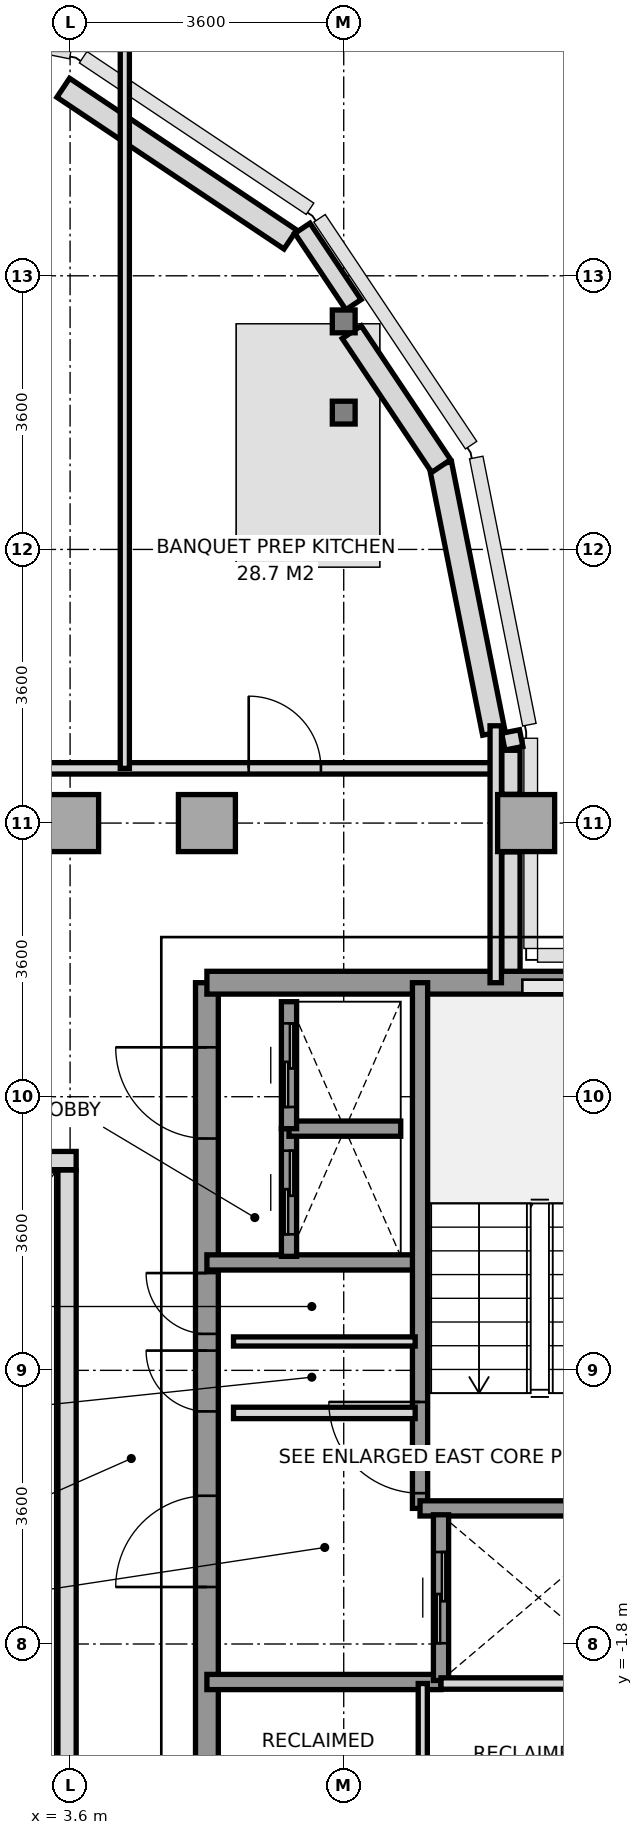
"""IFC4 building model, lengths in metres.
Left out: names, types, materials, properties, quantities, classifications, styles, units other than length and angle.
Written with IfcOpenShell. Run it as: python <this file> out.ifc"""

import sys

from ifc_helpers import new_model, si_unit, direction, frame, frame_2d, origin, origin_2d, place, context, subcontext, project, spatial, rectangle, i_section, extrude, source, transform, mapped, element, fill, save


model = new_model("IFC4")
c1 = context("Model", 3, precision=1e-05, world=origin(), true_north=direction((0.0, 1.0)))
c2 = subcontext(c1, "Body", "Model", "MODEL_VIEW")
j1 = project(units=[si_unit("LENGTHUNIT", "METRE"), si_unit("PLANEANGLEUNIT", "RADIAN")], contexts=[c1])
p1 = place(None, origin())
s1 = spatial("IfcSite", under=j1, at=p1, CompositionType="ELEMENT")
p2 = place(p1, origin())
s2 = spatial("IfcBuilding", under=s1, at=p2, CompositionType="ELEMENT")
p3 = place(p2, frame((0.0, 0.0, 258.8)))
s3 = spatial("IfcBuildingStorey", under=s2, at=p3, CompositionType="ELEMENT", Elevation=258.8)
m1 = source(origin(), c2, "Body", "SweptSolid", [
    extrude(rectangle(XDim=0.75, YDim=0.75, at=origin_2d()), origin(), (0.0, 0.0, 1.0), 3.01),
])
for number, where, z_axis, x_axis in (
    (1, (3.6, 9.0, 0.0), (0.0, 0.0, 1.0), (1.0, 0.0, 0.0)),
    (2, (5.4, 9.0, 0.0), (0.0, 0.0, 1.0), (1.0, 0.0, 0.0)),
):
    element("IfcColumn", number, at=place(p3, frame(where, z_axis=z_axis, x_axis=x_axis)), inside=s3, PredefinedType="COLUMN", context=c2, shape_type="MappedRepresentation", body=[
        mapped(m1, transform((0.0, 0.0, 0.0), x_axis=(1.0, 0.0, 0.0), y_axis=(0.0, 1.0, 0.0), z_axis=(0.0, 0.0, 1.0), scale=1.0)),
    ])
m2 = source(origin(), c2, "Body", "SweptSolid", [
    extrude(i_section(OverallWidth=0.3, OverallDepth=0.3, WebThickness=0.011, FlangeThickness=0.019, at=origin_2d()), origin(), (0.0, 0.0, 1.0), 3.01),
])
for number, where, z_axis, x_axis in (
    (3, (7.2, 14.4, 0.0), (0.0, 0.0, 1.0), (1.0, 0.0, 0.0)),
    (4, (7.2, 15.6, 0.0), (0.0, 0.0, 1.0), (1.0, 0.0, 0.0)),
):
    element("IfcColumn", number, at=place(p3, frame(where, z_axis=z_axis, x_axis=x_axis)), inside=s3, PredefinedType="COLUMN", context=c2, shape_type="MappedRepresentation", body=[
        mapped(m2, transform((0.0, 0.0, 0.0), x_axis=(1.0, 0.0, 0.0), y_axis=(0.0, 1.0, 0.0), z_axis=(0.0, 0.0, 1.0), scale=1.0)),
    ])
p4 = place(p3, frame((9.6, 9.0, 0.0), z_axis=(0.0, 0.0, 1.0), x_axis=(1.0, 0.0, 0.0)))
e5 = element("IfcColumn", 5, at=p4, inside=s3, PredefinedType="COLUMN", context=c2, shape_type="MappedRepresentation", body=[
    mapped(m1, transform((0.0, 0.0, 0.0), x_axis=(1.0, 0.0, 0.0), y_axis=(0.0, 1.0, 0.0), z_axis=(0.0, 0.0, 1.0), scale=1.0)),
])
p5 = place(p3, frame((9.175, 10.185, 0.0), z_axis=(0.0, 0.0, 1.0), x_axis=(-0.195114232679, 0.980780523974, 0.0)))
e6 = element("IfcWall", 6, at=p5, inside=s3, PredefinedType="SOLIDWALL", context=c2, shape_type="SweptSolid", body=[
    extrude(rectangle(XDim=3.609, YDim=0.3, at=frame_2d((1.804, 0.0))), origin(), (0.0, 0.0, 1.0), 3.01),
])
p6 = place(p3, frame((8.482, 13.698, 0.0), z_axis=(0.0, 0.0, 1.0), x_axis=(-0.555604299396, 0.831446848868, 0.0)))
e7 = element("IfcWall", 7, at=p6, inside=s3, PredefinedType="SOLIDWALL", context=c2, shape_type="SweptSolid", body=[
    extrude(rectangle(XDim=2.118, YDim=0.3, at=frame_2d((1.059, 0.0))), origin(), (0.0, 0.0, 1.0), 2.61),
])
p7 = place(p3, frame((6.498, 16.677, 0.0), z_axis=(0.0, 0.0, 1.0), x_axis=(-0.831443568068, 0.555609208993, 0.0)))
e8 = element("IfcWall", 8, at=p7, inside=s3, PredefinedType="SOLIDWALL", context=c2, shape_type="SweptSolid", body=[
    extrude(rectangle(XDim=3.594, YDim=0.3, at=frame_2d((1.797, 0.0))), origin(), (0.0, 0.0, 1.0), 3.01),
])
p8 = place(p3, frame((6.656, 16.825, 0.0), z_axis=(0.0, 0.0, 1.0), x_axis=(0.555585388542, -0.831459485506, 0.0)))
e9 = element("IfcWall", 9, at=p8, inside=s3, PredefinedType="PARAPET", context=c2, shape_type="SweptSolid", body=[
    extrude(rectangle(XDim=1.209, YDim=0.24, at=frame_2d((0.604, 0.0))), origin(), (0.0, 0.0, 1.0), 1.15),
])
p9 = place(p3, frame((9.395, 10.204, 0.0), z_axis=(0.0, 0.0, 1.0), x_axis=(0.194859894132, -0.980831087221, 0.0)))
e10 = element("IfcWall", 10, at=p9, inside=s3, PredefinedType="PARAPET", context=c2, shape_type="SweptSolid", body=[
    extrude(rectangle(XDim=0.224, YDim=0.24, at=frame_2d((0.112, 0.0))), origin(), (0.0, 0.0, 1.0), 1.15),
])
p10 = place(p3, frame((9.4, 9.958, 0.0), z_axis=(0.0, 0.0, 1.0), x_axis=(0.0, -1.0, 0.0)))
e11 = element("IfcWall", 11, at=p10, inside=s3, PredefinedType="PARAPET", context=c2, shape_type="SweptSolid", body=[
    extrude(rectangle(XDim=0.58, YDim=0.24, at=frame_2d((0.29, 0.0))), origin(), (0.0, 0.0, 1.0), 1.15),
])
p11 = place(p3, frame((9.4, 8.622, 0.0), z_axis=(0.0, 0.0, 1.0), x_axis=(0.0, -1.0, 0.0)))
e12 = element("IfcWall", 12, at=p11, inside=s3, PredefinedType="PARAPET", context=c2, shape_type="SweptSolid", body=[
    extrude(rectangle(XDim=1.669, YDim=0.24, at=frame_2d((0.834, 0.0))), origin(), (0.0, 0.0, 1.0), 1.15),
])
p12 = place(p3, frame((5.4, -5.6, 0.0), z_axis=(0.0, 0.0, 1.0), x_axis=(0.0, 1.0, 0.0)))
e13 = element("IfcWall", 13, at=p12, inside=s3, PredefinedType="SHEAR", context=c2, shape_type="SweptSolid", body=[
    extrude(rectangle(XDim=12.5, YDim=0.3, at=frame_2d((6.25, 0.0))), origin(), (0.0, 0.0, 1.0), 3.01),
])
p13 = place(p12, frame((4.55, 0.0, 0.0)))
e14 = element("IfcOpeningElement", 14, at=p13, cuts=e13, PredefinedType="OPENING", context=c2, shape_type="SweptSolid", body=[
    extrude(rectangle(XDim=1.2, YDim=2.2, at=frame_2d((0.6, 1.1))), frame((0.0, 0.16, 0.0), z_axis=(0.0, -1.0, 0.0), x_axis=(1.0, 0.0, 0.0)), (0.0, 0.0, 1.0), 0.32),
])
p14 = place(p12, frame((10.45, 0.0, 0.0)))
e15 = element("IfcOpeningElement", 15, at=p14, cuts=e13, PredefinedType="OPENING", context=c2, shape_type="SweptSolid", body=[
    extrude(rectangle(XDim=1.2, YDim=2.2, at=frame_2d((0.6, 1.1))), frame((0.0, 0.16, 0.0), z_axis=(0.0, -1.0, 0.0), x_axis=(1.0, 0.0, 0.0)), (0.0, 0.0, 1.0), 0.32),
])
p15 = place(p12, frame((6.86, 0.0, 0.0)))
e16 = element("IfcOpeningElement", 16, at=p15, cuts=e13, PredefinedType="OPENING", context=c2, shape_type="SweptSolid", body=[
    extrude(rectangle(XDim=0.8, YDim=2.1, at=frame_2d((0.4, 1.05))), frame((0.0, 0.16, 0.0), z_axis=(0.0, -1.0, 0.0), x_axis=(1.0, 0.0, 0.0)), (0.0, 0.0, 1.0), 0.32),
])
p16 = place(p12, frame((7.88, 0.0, 0.0)))
e17 = element("IfcOpeningElement", 17, at=p16, cuts=e13, PredefinedType="OPENING", context=c2, shape_type="SweptSolid", body=[
    extrude(rectangle(XDim=0.8, YDim=2.1, at=frame_2d((0.4, 1.05))), frame((0.0, 0.16, 0.0), z_axis=(0.0, -1.0, 0.0), x_axis=(1.0, 0.0, 0.0)), (0.0, 0.0, 1.0), 0.32),
])
p17 = place(p3, frame((5.4, 6.9, 0.0), z_axis=(0.0, 0.0, 1.0), x_axis=(1.0, 0.0, 0.0)))
e18 = element("IfcWall", 18, at=p17, inside=s3, PredefinedType="SHEAR", context=c2, shape_type="SweptSolid", body=[
    extrude(rectangle(XDim=6.95, YDim=0.3, at=frame_2d((3.475, 0.0))), origin(), (0.0, 0.0, 1.0), 3.01),
])
p18 = place(p3, frame((5.4, 3.22, 0.0), z_axis=(0.0, 0.0, 1.0), x_axis=(1.0, 0.0, 0.0)))
e19 = element("IfcWall", 19, at=p18, inside=s3, PredefinedType="SOLIDWALL", context=c2, shape_type="SweptSolid", body=[
    extrude(rectangle(XDim=2.78, YDim=0.2, at=frame_2d((1.39, 0.0))), origin(), (0.0, 0.0, 1.0), 3.01),
])
p19 = place(p3, frame((5.4, -2.3, 0.0), z_axis=(0.0, 0.0, 1.0), x_axis=(1.0, 0.0, 0.0)))
e20 = element("IfcWall", 20, at=p19, inside=s3, PredefinedType="SOLIDWALL", context=c2, shape_type="SweptSolid", body=[
    extrude(rectangle(XDim=3.08, YDim=0.2, at=frame_2d((1.54, 0.0))), origin(), (0.0, 0.0, 1.0), 3.01),
])
p20 = place(p3, frame((8.204, -0.016, 0.0), z_axis=(0.0, 0.0, 1.0), x_axis=(0.0, 1.0, 0.0)))
e21 = element("IfcWall", 21, at=p20, inside=s3, PredefinedType="SOLIDWALL", context=c2, shape_type="SweptSolid", body=[
    extrude(rectangle(XDim=6.916, YDim=0.2, at=frame_2d((3.458, 0.0))), origin(), (0.0, 0.0, 1.0), 3.01),
])
p21 = place(p20, frame((0.2, 0.0, 0.0)))
e22 = element("IfcOpeningElement", 22, at=p21, cuts=e21, PredefinedType="OPENING", context=c2, shape_type="SweptSolid", body=[
    extrude(rectangle(XDim=1.2, YDim=2.2, at=frame_2d((0.6, 1.1))), frame((0.0, 0.11, 0.0), z_axis=(0.0, -1.0, 0.0), x_axis=(1.0, 0.0, 0.0)), (0.0, 0.0, 1.0), 0.22),
])
p22 = place(p3, frame((8.204, -0.016, 0.0), z_axis=(0.0, 0.0, 1.0), x_axis=(1.0, 0.0, 0.0)))
e23 = element("IfcWall", 23, at=p22, inside=s3, PredefinedType="SOLIDWALL", context=c2, shape_type="SweptSolid", body=[
    extrude(rectangle(XDim=3.152, YDim=0.2, at=frame_2d((1.576, 0.0))), origin(), (0.0, 0.0, 1.0), 3.01),
])
p23 = place(p3, frame((8.48, -2.28, 0.0), z_axis=(0.0, 0.0, 1.0), x_axis=(0.0, 1.0, 0.0)))
e24 = element("IfcWall", 24, at=p23, inside=s3, PredefinedType="SOLIDWALL", context=c2, shape_type="SweptSolid", body=[
    extrude(rectangle(XDim=2.18, YDim=0.2, at=frame_2d((1.09, 0.0))), origin(), (0.0, 0.0, 1.0), 3.01),
])
p24 = place(p23, frame((0.49, 0.0, 0.0)))
e25 = element("IfcOpeningElement", 25, at=p24, cuts=e24, PredefinedType="OPENING", context=c2, shape_type="SweptSolid", body=[
    extrude(rectangle(XDim=1.2, YDim=2.2, at=frame_2d((0.6, 1.1))), frame((0.0, 0.11, 0.0), z_axis=(0.0, -1.0, 0.0), x_axis=(1.0, 0.0, 0.0)), (0.0, 0.0, 1.0), 0.22),
])
p25 = place(p3, frame((6.48, 3.3, 0.0), z_axis=(0.0, 0.0, 1.0), x_axis=(0.0, 1.0, 0.0)))
e26 = element("IfcWall", 26, at=p25, inside=s3, PredefinedType="SOLIDWALL", context=c2, shape_type="SweptSolid", body=[
    extrude(rectangle(XDim=1.68, YDim=0.2, at=frame_2d((0.84, 0.0))), origin(), (0.0, 0.0, 1.0), 3.01),
])
p26 = place(p25, frame((0.29, 0.0, 0.0)))
e27 = element("IfcOpeningElement", 27, at=p26, cuts=e26, PredefinedType="OPENING", context=c2, shape_type="SweptSolid", body=[
    extrude(rectangle(XDim=1.1, YDim=2.2, at=frame_2d((0.55, 1.1))), frame((0.0, 0.11, 0.0), z_axis=(0.0, -1.0, 0.0), x_axis=(1.0, 0.0, 0.0)), (0.0, 0.0, 1.0), 0.22),
])
p27 = place(p3, frame((6.48, 4.98, 0.0), z_axis=(0.0, 0.0, 1.0), x_axis=(1.0, 0.0, 0.0)))
e28 = element("IfcWall", 28, at=p27, inside=s3, PredefinedType="SOLIDWALL", context=c2, shape_type="SweptSolid", body=[
    extrude(rectangle(XDim=1.47, YDim=0.2, at=frame_2d((0.735, 0.0))), origin(), (0.0, 0.0, 1.0), 3.01),
])
p28 = place(p3, frame((6.48, 4.98, 0.0), z_axis=(0.0, 0.0, 1.0), x_axis=(0.0, 1.0, 0.0)))
e29 = element("IfcWall", 29, at=p28, inside=s3, PredefinedType="SOLIDWALL", context=c2, shape_type="SweptSolid", body=[
    extrude(rectangle(XDim=1.67, YDim=0.2, at=frame_2d((0.835, 0.0))), origin(), (0.0, 0.0, 1.0), 3.01),
])
p29 = place(p28, frame((0.285, 0.0, 0.0)))
e30 = element("IfcOpeningElement", 30, at=p29, cuts=e29, PredefinedType="OPENING", context=c2, shape_type="SweptSolid", body=[
    extrude(rectangle(XDim=1.1, YDim=2.2, at=frame_2d((0.55, 1.1))), frame((0.0, 0.11, 0.0), z_axis=(0.0, -1.0, 0.0), x_axis=(1.0, 0.0, 0.0)), (0.0, 0.0, 1.0), 0.22),
])
p30 = place(p3, frame((5.75, 1.24, 0.0), z_axis=(0.0, 0.0, 1.0), x_axis=(1.0, 0.0, 0.0)))
e31 = element("IfcWall", 31, at=p30, inside=s3, PredefinedType="PARTITIONING", context=c2, shape_type="SweptSolid", body=[
    extrude(rectangle(XDim=2.39, YDim=0.15, at=frame_2d((1.195, 0.0))), origin(), (0.0, 0.0, 1.0), 3.01),
])
p31 = place(p3, frame((5.75, 2.18, 0.0), z_axis=(0.0, 0.0, 1.0), x_axis=(1.0, 0.0, 0.0)))
e32 = element("IfcWall", 32, at=p31, inside=s3, PredefinedType="PARTITIONING", context=c2, shape_type="SweptSolid", body=[
    extrude(rectangle(XDim=2.39, YDim=0.12, at=frame_2d((1.195, 0.0))), origin(), (0.0, 0.0, 1.0), 3.01),
])
p32 = place(p3, frame((8.24, -5.26, 0.0), z_axis=(0.0, 0.0, 1.0), x_axis=(0.0, 1.0, 0.0)))
e33 = element("IfcWall", 33, at=p32, inside=s3, PredefinedType="PARTITIONING", context=c2, shape_type="SweptSolid", body=[
    extrude(rectangle(XDim=2.94, YDim=0.12, at=frame_2d((1.47, 0.0))), origin(), (0.0, 0.0, 1.0), 3.01),
])
p33 = place(p3, frame((8.48, -2.32, 0.0), z_axis=(0.0, 0.0, 1.0), x_axis=(1.0, 0.0, 0.0)))
e34 = element("IfcWall", 34, at=p33, inside=s3, PredefinedType="PARTITIONING", context=c2, shape_type="SweptSolid", body=[
    extrude(rectangle(XDim=2.44, YDim=0.15, at=frame_2d((1.22, 0.0))), origin(), (0.0, 0.0, 1.0), 3.01),
])
p34 = place(p3, frame((-9.2, 9.72, 0.0), z_axis=(0.0, 0.0, 1.0), x_axis=(1.0, 0.0, 0.0)))
e35 = element("IfcWall", 35, at=p34, inside=s3, PredefinedType="PARTITIONING", context=c2, shape_type="SweptSolid", body=[
    extrude(rectangle(XDim=18.4, YDim=0.15, at=frame_2d((9.2, 0.0))), origin(), (0.0, 0.0, 1.0), 3.01),
])
p35 = place(p34, frame((2.25, 0.0, 0.0)))
e36 = element("IfcOpeningElement", 36, at=p35, cuts=e35, PredefinedType="OPENING", context=c2, shape_type="SweptSolid", body=[
    extrude(rectangle(XDim=0.95, YDim=2.15, at=frame_2d((0.475, 1.075))), frame((0.0, 0.085, 0.0), z_axis=(0.0, -1.0, 0.0), x_axis=(1.0, 0.0, 0.0)), (0.0, 0.0, 1.0), 0.17),
])
p36 = place(p34, frame((9.8, 0.0, 0.0)))
e37 = element("IfcOpeningElement", 37, at=p36, cuts=e35, PredefinedType="OPENING", context=c2, shape_type="SweptSolid", body=[
    extrude(rectangle(XDim=1.1, YDim=2.2, at=frame_2d((0.55, 1.1))), frame((0.0, 0.085, 0.0), z_axis=(0.0, -1.0, 0.0), x_axis=(1.0, 0.0, 0.0)), (0.0, 0.0, 1.0), 0.17),
])
p37 = place(p34, frame((15.15, 0.0, 0.0)))
e38 = element("IfcOpeningElement", 38, at=p37, cuts=e35, PredefinedType="OPENING", context=c2, shape_type="SweptSolid", body=[
    extrude(rectangle(XDim=0.95, YDim=2.15, at=frame_2d((0.475, 1.075))), frame((0.0, 0.085, 0.0), z_axis=(0.0, -1.0, 0.0), x_axis=(1.0, 0.0, 0.0)), (0.0, 0.0, 1.0), 0.17),
])
p38 = place(p3, frame((9.2, 6.9, 0.0), z_axis=(0.0, 0.0, 1.0), x_axis=(0.0, 1.0, 0.0)))
e39 = element("IfcWall", 39, at=p38, inside=s3, PredefinedType="PARTITIONING", context=c2, shape_type="SweptSolid", body=[
    extrude(rectangle(XDim=3.38, YDim=0.15, at=frame_2d((1.69, 0.0))), origin(), (0.0, 0.0, 1.0), 2.61),
])
p39 = place(p3, frame((4.32, 9.72, 0.0), z_axis=(0.0, 0.0, 1.0), x_axis=(0.0, 1.0, 0.0)))
e40 = element("IfcWall", 40, at=p39, inside=s3, PredefinedType="PARTITIONING", context=c2, shape_type="SweptSolid", body=[
    extrude(rectangle(XDim=9.53, YDim=0.12, at=frame_2d((4.765, 0.0))), origin(), (0.0, 0.0, 1.0), 2.61),
])
p40 = place(p3, frame((-3.68, 4.56, 0.0), z_axis=(0.0, 0.0, 1.0), x_axis=(1.0, 0.0, 0.0)))
e41 = element("IfcWall", 41, at=p40, inside=s3, PredefinedType="PARAPET", context=c2, shape_type="SweptSolid", body=[
    extrude(rectangle(XDim=7.36, YDim=0.24, at=frame_2d((3.68, 0.0))), origin(), (0.0, 0.0, 1.0), 1.15),
])
p41 = place(p3, frame((3.56, -4.435, 0.0), z_axis=(0.0, 0.0, 1.0), x_axis=(0.0, 1.0, 0.0)))
e42 = element("IfcWall", 42, at=p41, inside=s3, PredefinedType="PARAPET", context=c2, shape_type="SweptSolid", body=[
    extrude(rectangle(XDim=8.87, YDim=0.24, at=frame_2d((4.435, 0.0))), origin(), (0.0, 0.0, 1.0), 1.15),
])
m3 = source(origin(), c2, "Body", "SweptSolid", [
    extrude(rectangle(XDim=1.2, YDim=2.2, at=frame_2d((0.6, 1.1))), frame((0.0, 0.025, 0.0), z_axis=(0.0, -1.0, 0.0), x_axis=(1.0, 0.0, 0.0)), (0.0, 0.0, 1.0), 0.05),
])
p42 = place(p21, origin())
e43 = element("IfcDoor", 43, at=p42, inside=s3, OperationType="SINGLE_SWING_RIGHT", PredefinedType="DOOR", context=c2, shape_type="MappedRepresentation", body=[
    mapped(m3, transform((0.0, 0.0, 0.0), x_axis=(1.0, 0.0, 0.0), y_axis=(0.0, 1.0, 0.0), z_axis=(0.0, 0.0, 1.0), scale=1.0)),
])
fill(e22, e43)
p43 = place(p13, origin())
e44 = element("IfcDoor", 44, at=p43, inside=s3, OperationType="SINGLE_SWING_LEFT", PredefinedType="DOOR", context=c2, shape_type="MappedRepresentation", body=[
    mapped(m3, transform((0.0, 0.0, 0.0), x_axis=(1.0, 0.0, 0.0), y_axis=(0.0, 1.0, 0.0), z_axis=(0.0, 0.0, 1.0), scale=1.0)),
])
fill(e14, e44)
p44 = place(p14, origin())
e45 = element("IfcDoor", 45, at=p44, inside=s3, OperationType="SINGLE_SWING_RIGHT", PredefinedType="DOOR", context=c2, shape_type="MappedRepresentation", body=[
    mapped(m3, transform((0.0, 0.0, 0.0), x_axis=(1.0, 0.0, 0.0), y_axis=(0.0, 1.0, 0.0), z_axis=(0.0, 0.0, 1.0), scale=1.0)),
])
fill(e15, e45)
m4 = source(origin(), c2, "Body", "SweptSolid", [
    extrude(rectangle(XDim=0.8, YDim=2.1, at=frame_2d((0.4, 1.05))), frame((0.0, 0.025, 0.0), z_axis=(0.0, -1.0, 0.0), x_axis=(1.0, 0.0, 0.0)), (0.0, 0.0, 1.0), 0.05),
])
p45 = place(p15, origin())
e46 = element("IfcDoor", 46, at=p45, inside=s3, OperationType="SINGLE_SWING_RIGHT", PredefinedType="DOOR", context=c2, shape_type="MappedRepresentation", body=[
    mapped(m4, transform((0.0, 0.0, 0.0), x_axis=(1.0, 0.0, 0.0), y_axis=(0.0, 1.0, 0.0), z_axis=(0.0, 0.0, 1.0), scale=1.0)),
])
fill(e16, e46)
p46 = place(p16, origin())
e47 = element("IfcDoor", 47, at=p46, inside=s3, OperationType="SINGLE_SWING_RIGHT", PredefinedType="DOOR", context=c2, shape_type="MappedRepresentation", body=[
    mapped(m4, transform((0.0, 0.0, 0.0), x_axis=(1.0, 0.0, 0.0), y_axis=(0.0, 1.0, 0.0), z_axis=(0.0, 0.0, 1.0), scale=1.0)),
])
fill(e17, e47)
p47 = place(p24, origin())
e48 = element("IfcDoor", 48, at=p47, inside=s3, OperationType="SLIDING_TO_RIGHT", PredefinedType="DOOR", context=c2, shape_type="MappedRepresentation", body=[
    mapped(m3, transform((0.0, 0.0, 0.0), x_axis=(1.0, 0.0, 0.0), y_axis=(0.0, 1.0, 0.0), z_axis=(0.0, 0.0, 1.0), scale=1.0)),
])
fill(e25, e48)
m5 = source(origin(), c2, "Body", "SweptSolid", [
    extrude(rectangle(XDim=1.1, YDim=2.2, at=frame_2d((0.55, 1.1))), frame((0.0, 0.025, 0.0), z_axis=(0.0, -1.0, 0.0), x_axis=(1.0, 0.0, 0.0)), (0.0, 0.0, 1.0), 0.05),
])
p48 = place(p26, origin())
e49 = element("IfcDoor", 49, at=p48, inside=s3, OperationType="SLIDING_TO_LEFT", PredefinedType="DOOR", context=c2, shape_type="MappedRepresentation", body=[
    mapped(m5, transform((0.0, 0.0, 0.0), x_axis=(1.0, 0.0, 0.0), y_axis=(0.0, 1.0, 0.0), z_axis=(0.0, 0.0, 1.0), scale=1.0)),
])
fill(e27, e49)
p49 = place(p29, origin())
e50 = element("IfcDoor", 50, at=p49, inside=s3, OperationType="SLIDING_TO_LEFT", PredefinedType="DOOR", context=c2, shape_type="MappedRepresentation", body=[
    mapped(m5, transform((0.0, 0.0, 0.0), x_axis=(1.0, 0.0, 0.0), y_axis=(0.0, 1.0, 0.0), z_axis=(0.0, 0.0, 1.0), scale=1.0)),
])
fill(e30, e50)
m6 = source(origin(), c2, "Body", "SweptSolid", [
    extrude(rectangle(XDim=0.95, YDim=2.15, at=frame_2d((0.475, 1.075))), frame((0.0, 0.025, 0.0), z_axis=(0.0, -1.0, 0.0), x_axis=(1.0, 0.0, 0.0)), (0.0, 0.0, 1.0), 0.05),
])
p50 = place(p37, origin())
e51 = element("IfcDoor", 51, at=p50, inside=s3, OperationType="SINGLE_SWING_LEFT", PredefinedType="DOOR", context=c2, shape_type="MappedRepresentation", body=[
    mapped(m6, transform((0.0, 0.0, 0.0), x_axis=(1.0, 0.0, 0.0), y_axis=(0.0, 1.0, 0.0), z_axis=(0.0, 0.0, 1.0), scale=1.0)),
])
fill(e38, e51)
save(model, sys.argv[1])
